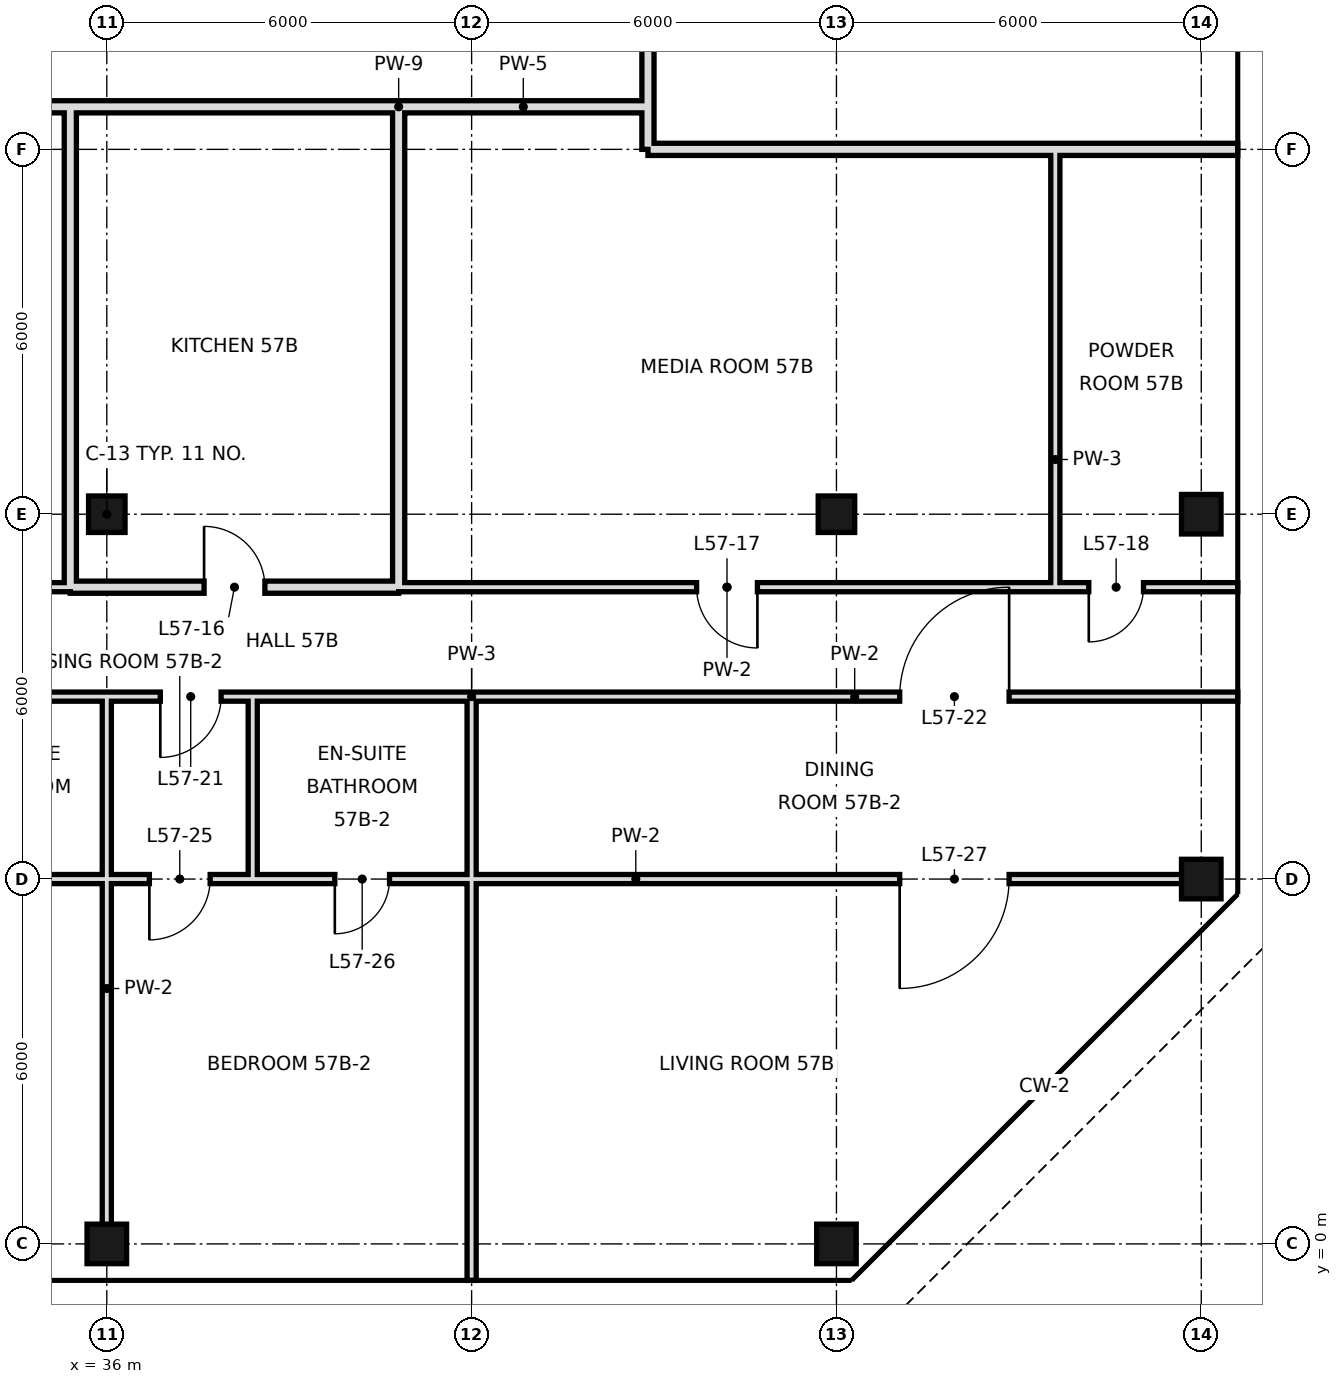
"""IFC4 building model, lengths in metres.
Left out: names, types, materials, properties, quantities, classifications, styles, units other than length and angle.
Written with IfcOpenShell. Run it as: python <this file> out.ifc"""

import sys

from ifc_helpers import new_model, si_unit, direction, frame, frame_2d, origin, origin_2d, place, context, subcontext, project, spatial, rectangle, hollow_rectangle, extrude, element, fill, save


model = new_model("IFC4")
c1 = context("Model", 3, precision=1e-05, world=origin(), true_north=direction((0.0, 1.0)))
c2 = subcontext(c1, "Body", "Model", "MODEL_VIEW")
j1 = project(units=[si_unit("LENGTHUNIT", "METRE"), si_unit("PLANEANGLEUNIT", "RADIAN")], contexts=[c1])
p1 = place(None, origin())
s1 = spatial("IfcSite", under=j1, at=p1, CompositionType="ELEMENT")
p2 = place(p1, origin())
s2 = spatial("IfcBuilding", under=s1, at=p2, CompositionType="ELEMENT")
p3 = place(p2, frame((0.0, 0.0, 243.2)))
s3 = spatial("IfcBuildingStorey", under=s2, at=p3, CompositionType="ELEMENT", Elevation=243.2)
p4 = place(p3, frame((36.0, 0.0, 0.0), z_axis=(0.0, 0.0, 1.0), x_axis=(1.0, 0.0, 0.0)))
e1 = element("IfcColumn", 1, at=p4, inside=s3, PredefinedType="COLUMN", context=c2, shape_type="SweptSolid", body=[
    extrude(hollow_rectangle(XDim=0.65, YDim=0.65, WallThickness=0.032, at=origin_2d()), origin(), (0.0, 0.0, 1.0), 3.6),
])
p5 = place(p3, frame((36.0, 12.0, 0.0), z_axis=(0.0, 0.0, 1.0), x_axis=(1.0, 0.0, 0.0)))
e2 = element("IfcColumn", 2, at=p5, inside=s3, PredefinedType="COLUMN", context=c2, shape_type="SweptSolid", body=[
    extrude(hollow_rectangle(XDim=0.6, YDim=0.6, WallThickness=0.028, at=origin_2d()), origin(), (0.0, 0.0, 1.0), 3.6),
])
p6 = place(p3, frame((48.0, 0.0, 0.0), z_axis=(0.0, 0.0, 1.0), x_axis=(1.0, 0.0, 0.0)))
e3 = element("IfcColumn", 3, at=p6, inside=s3, PredefinedType="COLUMN", context=c2, shape_type="SweptSolid", body=[
    extrude(hollow_rectangle(XDim=0.65, YDim=0.65, WallThickness=0.032, at=origin_2d()), origin(), (0.0, 0.0, 1.0), 3.6),
])
p7 = place(p3, frame((48.0, 12.0, 0.0), z_axis=(0.0, 0.0, 1.0), x_axis=(1.0, 0.0, 0.0)))
e4 = element("IfcColumn", 4, at=p7, inside=s3, PredefinedType="COLUMN", context=c2, shape_type="SweptSolid", body=[
    extrude(hollow_rectangle(XDim=0.6, YDim=0.6, WallThickness=0.028, at=origin_2d()), origin(), (0.0, 0.0, 1.0), 3.6),
])
for number, where, z_axis, x_axis in (
    (5, (54.0, 6.0, 0.0), (0.0, 0.0, 1.0), (1.0, 0.0, 0.0)),
    (6, (54.0, 12.0, 0.0), (0.0, 0.0, 1.0), (1.0, 0.0, 0.0)),
):
    element("IfcColumn", number, at=place(p3, frame(where, z_axis=z_axis, x_axis=x_axis)), inside=s3, PredefinedType="COLUMN", context=c2, shape_type="SweptSolid", body=[
        extrude(hollow_rectangle(XDim=0.65, YDim=0.65, WallThickness=0.032, at=origin_2d()), origin(), (0.0, 0.0, 1.0), 3.6),
    ])
p8 = place(p3, frame((35.4, 10.8, 0.0), z_axis=(0.0, 0.0, 1.0), x_axis=(0.0, 1.0, 0.0)))
e7 = element("IfcWall", 7, at=p8, inside=s3, PredefinedType="SOLIDWALL", context=c2, shape_type="SweptSolid", body=[
    extrude(rectangle(XDim=7.9, YDim=0.2, at=frame_2d((3.95, 0.0))), origin(), (0.0, 0.0, 1.0), 2.72),
])
p9 = place(p3, frame((36.0, 0.0, 0.0), z_axis=(0.0, 0.0, 1.0), x_axis=(0.0, 1.0, 0.0)))
e8 = element("IfcWall", 8, at=p9, inside=s3, PredefinedType="PARTITIONING", context=c2, shape_type="SweptSolid", body=[
    extrude(rectangle(XDim=6.0, YDim=0.15, at=frame_2d((3.0, 0.0))), origin(), (0.0, 0.0, 1.0), 2.72),
])
p10 = place(p3, frame((36.0, 6.0, 0.0), z_axis=(0.0, 0.0, 1.0), x_axis=(0.0, 1.0, 0.0)))
e9 = element("IfcWall", 9, at=p10, inside=s3, PredefinedType="PARTITIONING", context=c2, shape_type="SweptSolid", body=[
    extrude(rectangle(XDim=3.0, YDim=0.15, at=frame_2d((1.5, 0.0))), origin(), (0.0, 0.0, 1.0), 2.72),
])
p11 = place(p3, frame((38.4, 6.0, 0.0), z_axis=(0.0, 0.0, 1.0), x_axis=(0.0, 1.0, 0.0)))
e10 = element("IfcWall", 10, at=p11, inside=s3, PredefinedType="PARTITIONING", context=c2, shape_type="SweptSolid", body=[
    extrude(rectangle(XDim=3.0, YDim=0.15, at=frame_2d((1.5, 0.0))), origin(), (0.0, 0.0, 1.0), 3.42),
])
p12 = place(p3, frame((40.8, 10.8, 0.0), z_axis=(0.0, 0.0, 1.0), x_axis=(0.0, 1.0, 0.0)))
e11 = element("IfcWall", 11, at=p12, inside=s3, PredefinedType="SOLIDWALL", context=c2, shape_type="SweptSolid", body=[
    extrude(rectangle(XDim=7.9, YDim=0.2, at=frame_2d((3.95, 0.0))), origin(), (0.0, 0.0, 1.0), 2.72),
])
p13 = place(p3, frame((42.0, -0.6, 0.0), z_axis=(0.0, 0.0, 1.0), x_axis=(0.0, 1.0, 0.0)))
e12 = element("IfcWall", 12, at=p13, inside=s3, PredefinedType="PARTITIONING", context=c2, shape_type="SweptSolid", body=[
    extrude(rectangle(XDim=6.6, YDim=0.15, at=frame_2d((3.3, 0.0))), origin(), (0.0, 0.0, 1.0), 2.72),
])
p14 = place(p3, frame((42.0, 6.0, 0.0), z_axis=(0.0, 0.0, 1.0), x_axis=(0.0, 1.0, 0.0)))
e13 = element("IfcWall", 13, at=p14, inside=s3, PredefinedType="PARTITIONING", context=c2, shape_type="SweptSolid", body=[
    extrude(rectangle(XDim=3.0, YDim=0.15, at=frame_2d((1.5, 0.0))), origin(), (0.0, 0.0, 1.0), 2.72),
])
p15 = place(p3, frame((44.9, 18.0, 0.0), z_axis=(0.0, 0.0, 1.0), x_axis=(0.0, 1.0, 0.0)))
e14 = element("IfcWall", 14, at=p15, inside=s3, PredefinedType="SOLIDWALL", context=c2, shape_type="SweptSolid", body=[
    extrude(rectangle(XDim=30.6, YDim=0.2, at=frame_2d((15.3, 0.0))), origin(), (0.0, 0.0, 1.0), 2.72),
])
p16 = place(p15, frame((20.27, 0.0, 0.0)))
e15 = element("IfcOpeningElement", 15, at=p16, cuts=e14, PredefinedType="OPENING", context=c2, shape_type="SweptSolid", body=[
    extrude(rectangle(XDim=1.2, YDim=2.4, at=frame_2d((0.6, 1.2))), frame((0.0, 0.11, 0.0), z_axis=(0.0, -1.0, 0.0), x_axis=(1.0, 0.0, 0.0)), (0.0, 0.0, 1.0), 0.22),
])
p17 = place(p3, frame((51.6, 10.8, 0.0), z_axis=(0.0, 0.0, 1.0), x_axis=(0.0, 1.0, 0.0)))
e16 = element("IfcWall", 16, at=p17, inside=s3, PredefinedType="PARTITIONING", context=c2, shape_type="SweptSolid", body=[
    extrude(rectangle(XDim=7.2, YDim=0.15, at=frame_2d((3.6, 0.0))), origin(), (0.0, 0.0, 1.0), 3.42),
])
p18 = place(p3, frame((35.4, 10.8, 0.0), z_axis=(0.0, 0.0, 1.0), x_axis=(1.0, 0.0, 0.0)))
e17 = element("IfcWall", 17, at=p18, inside=s3, PredefinedType="SOLIDWALL", context=c2, shape_type="SweptSolid", body=[
    extrude(rectangle(XDim=5.4, YDim=0.2, at=frame_2d((2.7, 0.0))), origin(), (0.0, 0.0, 1.0), 2.72),
])
p19 = place(p18, frame((2.2, 0.0, 0.0)))
e18 = element("IfcOpeningElement", 18, at=p19, cuts=e17, PredefinedType="OPENING", context=c2, shape_type="SweptSolid", body=[
    extrude(rectangle(XDim=1.0, YDim=2.4, at=frame_2d((0.5, 1.2))), frame((0.0, 0.11, 0.0), z_axis=(0.0, -1.0, 0.0), x_axis=(1.0, 0.0, 0.0)), (0.0, 0.0, 1.0), 0.22),
])
p20 = place(p3, frame((6.0, 10.8, 0.0), z_axis=(0.0, 0.0, 1.0), x_axis=(1.0, 0.0, 0.0)))
e19 = element("IfcWall", 19, at=p20, inside=s3, PredefinedType="PARTITIONING", context=c2, shape_type="SweptSolid", body=[
    extrude(rectangle(XDim=29.4, YDim=0.15, at=frame_2d((14.7, 0.0))), origin(), (0.0, 0.0, 1.0), 3.42),
])
p21 = place(p20, frame((3.4, 0.0, 0.0)))
e20 = element("IfcOpeningElement", 20, at=p21, cuts=e19, PredefinedType="OPENING", context=c2, shape_type="SweptSolid", body=[
    extrude(rectangle(XDim=1.0, YDim=2.4, at=frame_2d((0.5, 1.2))), frame((0.0, 0.085, 0.0), z_axis=(0.0, -1.0, 0.0), x_axis=(1.0, 0.0, 0.0)), (0.0, 0.0, 1.0), 0.17),
])
p22 = place(p20, frame((9.4, 0.0, 0.0)))
e21 = element("IfcOpeningElement", 21, at=p22, cuts=e19, PredefinedType="OPENING", context=c2, shape_type="SweptSolid", body=[
    extrude(rectangle(XDim=1.0, YDim=2.4, at=frame_2d((0.5, 1.2))), frame((0.0, 0.085, 0.0), z_axis=(0.0, -1.0, 0.0), x_axis=(1.0, 0.0, 0.0)), (0.0, 0.0, 1.0), 0.17),
])
p23 = place(p20, frame((19.3, 0.0, 0.0)))
e22 = element("IfcOpeningElement", 22, at=p23, cuts=e19, PredefinedType="OPENING", context=c2, shape_type="SweptSolid", body=[
    extrude(rectangle(XDim=1.0, YDim=2.4, at=frame_2d((0.5, 1.2))), frame((0.0, 0.085, 0.0), z_axis=(0.0, -1.0, 0.0), x_axis=(1.0, 0.0, 0.0)), (0.0, 0.0, 1.0), 0.17),
])
p24 = place(p20, frame((25.0, 0.0, 0.0)))
e23 = element("IfcOpeningElement", 23, at=p24, cuts=e19, PredefinedType="OPENING", context=c2, shape_type="SweptSolid", body=[
    extrude(rectangle(XDim=1.0, YDim=2.4, at=frame_2d((0.5, 1.2))), frame((0.0, 0.085, 0.0), z_axis=(0.0, -1.0, 0.0), x_axis=(1.0, 0.0, 0.0)), (0.0, 0.0, 1.0), 0.17),
])
p25 = place(p3, frame((40.8, 10.8, 0.0), z_axis=(0.0, 0.0, 1.0), x_axis=(1.0, 0.0, 0.0)))
e24 = element("IfcWall", 24, at=p25, inside=s3, PredefinedType="PARTITIONING", context=c2, shape_type="SweptSolid", body=[
    extrude(rectangle(XDim=10.8, YDim=0.15, at=frame_2d((5.4, 0.0))), origin(), (0.0, 0.0, 1.0), 3.42),
])
p26 = place(p25, frame((4.9, 0.0, 0.0)))
e25 = element("IfcOpeningElement", 25, at=p26, cuts=e24, PredefinedType="OPENING", context=c2, shape_type="SweptSolid", body=[
    extrude(rectangle(XDim=1.0, YDim=2.4, at=frame_2d((0.5, 1.2))), frame((0.0, 0.085, 0.0), z_axis=(0.0, -1.0, 0.0), x_axis=(1.0, 0.0, 0.0)), (0.0, 0.0, 1.0), 0.17),
])
p27 = place(p3, frame((51.6, 10.8, 0.0), z_axis=(0.0, 0.0, 1.0), x_axis=(1.0, 0.0, 0.0)))
e26 = element("IfcWall", 26, at=p27, inside=s3, PredefinedType="PARTITIONING", context=c2, shape_type="SweptSolid", body=[
    extrude(rectangle(XDim=3.0, YDim=0.15, at=frame_2d((1.5, 0.0))), origin(), (0.0, 0.0, 1.0), 3.42),
])
p28 = place(p27, frame((0.55, 0.0, 0.0)))
e27 = element("IfcOpeningElement", 27, at=p28, cuts=e26, PredefinedType="OPENING", context=c2, shape_type="SweptSolid", body=[
    extrude(rectangle(XDim=0.9, YDim=2.4, at=frame_2d((0.45, 1.2))), frame((0.0, 0.085, 0.0), z_axis=(0.0, -1.0, 0.0), x_axis=(1.0, 0.0, 0.0)), (0.0, 0.0, 1.0), 0.17),
])
p29 = place(p3, frame((44.9, 18.0, 0.0), z_axis=(0.0, 0.0, 1.0), x_axis=(1.0, 0.0, 0.0)))
e28 = element("IfcWall", 28, at=p29, inside=s3, PredefinedType="SOLIDWALL", context=c2, shape_type="SweptSolid", body=[
    extrude(rectangle(XDim=9.7, YDim=0.2, at=frame_2d((4.85, 0.0))), origin(), (0.0, 0.0, 1.0), 2.72),
])
p30 = place(p3, frame((6.0, 18.7, 0.0), z_axis=(0.0, 0.0, 1.0), x_axis=(1.0, 0.0, 0.0)))
e29 = element("IfcWall", 29, at=p30, inside=s3, PredefinedType="SOLIDWALL", context=c2, shape_type="SweptSolid", body=[
    extrude(rectangle(XDim=29.4, YDim=0.2, at=frame_2d((14.7, 0.0))), origin(), (0.0, 0.0, 1.0), 2.72),
])
p31 = place(p30, frame((1.54, 0.0, 0.0)))
e30 = element("IfcOpeningElement", 30, at=p31, cuts=e29, PredefinedType="OPENING", context=c2, shape_type="SweptSolid", body=[
    extrude(rectangle(XDim=1.2, YDim=2.4, at=frame_2d((0.6, 1.2))), frame((0.0, 0.11, 0.0), z_axis=(0.0, -1.0, 0.0), x_axis=(1.0, 0.0, 0.0)), (0.0, 0.0, 1.0), 0.22),
])
p32 = place(p30, frame((19.58, 0.0, 0.0)))
e31 = element("IfcOpeningElement", 31, at=p32, cuts=e29, PredefinedType="OPENING", context=c2, shape_type="SweptSolid", body=[
    extrude(rectangle(XDim=1.2, YDim=2.4, at=frame_2d((0.6, 1.2))), frame((0.0, 0.11, 0.0), z_axis=(0.0, -1.0, 0.0), x_axis=(1.0, 0.0, 0.0)), (0.0, 0.0, 1.0), 0.22),
])
p33 = place(p3, frame((40.8, 18.7, 0.0), z_axis=(0.0, 0.0, 1.0), x_axis=(1.0, 0.0, 0.0)))
e32 = element("IfcWall", 32, at=p33, inside=s3, PredefinedType="SOLIDWALL", context=c2, shape_type="SweptSolid", body=[
    extrude(rectangle(XDim=4.1, YDim=0.2, at=frame_2d((2.05, 0.0))), origin(), (0.0, 0.0, 1.0), 2.72),
])
p34 = place(p3, frame((35.4, 18.7, 0.0), z_axis=(0.0, 0.0, 1.0), x_axis=(1.0, 0.0, 0.0)))
e33 = element("IfcWall", 33, at=p34, inside=s3, PredefinedType="SOLIDWALL", context=c2, shape_type="SweptSolid", body=[
    extrude(rectangle(XDim=5.4, YDim=0.2, at=frame_2d((2.7, 0.0))), origin(), (0.0, 0.0, 1.0), 3.42),
])
p35 = place(p3, frame((36.0, 6.0, 0.0), z_axis=(0.0, 0.0, 1.0), x_axis=(1.0, 0.0, 0.0)))
e34 = element("IfcWall", 34, at=p35, inside=s3, PredefinedType="PARTITIONING", context=c2, shape_type="SweptSolid", body=[
    extrude(rectangle(XDim=2.4, YDim=0.15, at=frame_2d((1.2, 0.0))), origin(), (0.0, 0.0, 1.0), 2.97),
])
p36 = place(p35, frame((0.7, 0.0, 0.0)))
e35 = element("IfcOpeningElement", 35, at=p36, cuts=e34, PredefinedType="OPENING", context=c2, shape_type="SweptSolid", body=[
    extrude(rectangle(XDim=1.0, YDim=2.4, at=frame_2d((0.5, 1.2))), frame((0.0, 0.085, 0.0), z_axis=(0.0, -1.0, 0.0), x_axis=(1.0, 0.0, 0.0)), (0.0, 0.0, 1.0), 0.17),
])
p37 = place(p3, frame((42.0, 6.0, 0.0), z_axis=(0.0, 0.0, 1.0), x_axis=(1.0, 0.0, 0.0)))
e36 = element("IfcWall", 36, at=p37, inside=s3, PredefinedType="PARTITIONING", context=c2, shape_type="SweptSolid", body=[
    extrude(rectangle(XDim=12.0, YDim=0.15, at=frame_2d((6.0, 0.0))), origin(), (0.0, 0.0, 1.0), 2.97),
])
p38 = place(p37, frame((7.04, 0.0, 0.0)))
e37 = element("IfcOpeningElement", 37, at=p38, cuts=e36, PredefinedType="OPENING", context=c2, shape_type="SweptSolid", body=[
    extrude(rectangle(XDim=1.8, YDim=2.4, at=frame_2d((0.9, 1.2))), frame((0.0, 0.085, 0.0), z_axis=(0.0, -1.0, 0.0), x_axis=(1.0, 0.0, 0.0)), (0.0, 0.0, 1.0), 0.17),
])
p39 = place(p3, frame((33.0, 6.0, 0.0), z_axis=(0.0, 0.0, 1.0), x_axis=(1.0, 0.0, 0.0)))
e38 = element("IfcWall", 38, at=p39, inside=s3, PredefinedType="PARTITIONING", context=c2, shape_type="SweptSolid", body=[
    extrude(rectangle(XDim=3.0, YDim=0.15, at=frame_2d((1.5, 0.0))), origin(), (0.0, 0.0, 1.0), 2.97),
])
p40 = place(p39, frame((0.73, 0.0, 0.0)))
e39 = element("IfcOpeningElement", 39, at=p40, cuts=e38, PredefinedType="OPENING", context=c2, shape_type="SweptSolid", body=[
    extrude(rectangle(XDim=0.9, YDim=2.4, at=frame_2d((0.45, 1.2))), frame((0.0, 0.085, 0.0), z_axis=(0.0, -1.0, 0.0), x_axis=(1.0, 0.0, 0.0)), (0.0, 0.0, 1.0), 0.17),
])
p41 = place(p3, frame((38.4, 6.0, 0.0), z_axis=(0.0, 0.0, 1.0), x_axis=(1.0, 0.0, 0.0)))
e40 = element("IfcWall", 40, at=p41, inside=s3, PredefinedType="PARTITIONING", context=c2, shape_type="SweptSolid", body=[
    extrude(rectangle(XDim=3.6, YDim=0.15, at=frame_2d((1.8, 0.0))), origin(), (0.0, 0.0, 1.0), 2.97),
])
p42 = place(p41, frame((1.35, 0.0, 0.0)))
e41 = element("IfcOpeningElement", 41, at=p42, cuts=e40, PredefinedType="OPENING", context=c2, shape_type="SweptSolid", body=[
    extrude(rectangle(XDim=0.9, YDim=2.4, at=frame_2d((0.45, 1.2))), frame((0.0, 0.085, 0.0), z_axis=(0.0, -1.0, 0.0), x_axis=(1.0, 0.0, 0.0)), (0.0, 0.0, 1.0), 0.17),
])
p43 = place(p3, frame((36.0, 9.0, 0.0), z_axis=(0.0, 0.0, 1.0), x_axis=(1.0, 0.0, 0.0)))
e42 = element("IfcWall", 42, at=p43, inside=s3, PredefinedType="PARTITIONING", context=c2, shape_type="SweptSolid", body=[
    extrude(rectangle(XDim=2.4, YDim=0.15, at=frame_2d((1.2, 0.0))), origin(), (0.0, 0.0, 1.0), 3.42),
])
p44 = place(p43, frame((0.88, 0.0, 0.0)))
e43 = element("IfcOpeningElement", 43, at=p44, cuts=e42, PredefinedType="OPENING", context=c2, shape_type="SweptSolid", body=[
    extrude(rectangle(XDim=1.0, YDim=2.4, at=frame_2d((0.5, 1.2))), frame((0.0, 0.085, 0.0), z_axis=(0.0, -1.0, 0.0), x_axis=(1.0, 0.0, 0.0)), (0.0, 0.0, 1.0), 0.17),
])
p45 = place(p3, frame((42.0, 9.0, 0.0), z_axis=(0.0, 0.0, 1.0), x_axis=(1.0, 0.0, 0.0)))
e44 = element("IfcWall", 44, at=p45, inside=s3, PredefinedType="PARTITIONING", context=c2, shape_type="SweptSolid", body=[
    extrude(rectangle(XDim=12.6, YDim=0.15, at=frame_2d((6.3, 0.0))), origin(), (0.0, 0.0, 1.0), 3.42),
])
p46 = place(p45, frame((7.04, 0.0, 0.0)))
e45 = element("IfcOpeningElement", 45, at=p46, cuts=e44, PredefinedType="OPENING", context=c2, shape_type="SweptSolid", body=[
    extrude(rectangle(XDim=1.8, YDim=2.4, at=frame_2d((0.9, 1.2))), frame((0.0, 0.085, 0.0), z_axis=(0.0, -1.0, 0.0), x_axis=(1.0, 0.0, 0.0)), (0.0, 0.0, 1.0), 0.17),
])
p47 = place(p3, frame((33.0, 9.0, 0.0), z_axis=(0.0, 0.0, 1.0), x_axis=(1.0, 0.0, 0.0)))
e46 = element("IfcWall", 46, at=p47, inside=s3, PredefinedType="PARTITIONING", context=c2, shape_type="SweptSolid", body=[
    extrude(rectangle(XDim=3.0, YDim=0.15, at=frame_2d((1.5, 0.0))), origin(), (0.0, 0.0, 1.0), 3.42),
])
p48 = place(p3, frame((38.4, 9.0, 0.0), z_axis=(0.0, 0.0, 1.0), x_axis=(1.0, 0.0, 0.0)))
e47 = element("IfcWall", 47, at=p48, inside=s3, PredefinedType="PARTITIONING", context=c2, shape_type="SweptSolid", body=[
    extrude(rectangle(XDim=3.6, YDim=0.15, at=frame_2d((1.8, 0.0))), origin(), (0.0, 0.0, 1.0), 3.42),
])
p49 = place(p19, origin())
e48 = element("IfcDoor", 48, at=p49, inside=s3, OperationType="SINGLE_SWING_LEFT", PredefinedType="DOOR", context=c2, shape_type="SweptSolid", body=[
    extrude(rectangle(XDim=1.0, YDim=2.4, at=frame_2d((0.5, 1.2))), frame((0.0, 0.025, 0.0), z_axis=(0.0, -1.0, 0.0), x_axis=(1.0, 0.0, 0.0)), (0.0, 0.0, 1.0), 0.05),
])
fill(e18, e48)
p50 = place(p26, origin())
e49 = element("IfcDoor", 49, at=p50, inside=s3, OperationType="SINGLE_SWING_RIGHT", PredefinedType="DOOR", context=c2, shape_type="SweptSolid", body=[
    extrude(rectangle(XDim=1.0, YDim=2.4, at=frame_2d((0.5, 1.2))), frame((0.0, 0.025, 0.0), z_axis=(0.0, -1.0, 0.0), x_axis=(1.0, 0.0, 0.0)), (0.0, 0.0, 1.0), 0.05),
])
fill(e25, e49)
p51 = place(p28, frame((0.9, 0.0, 0.0), z_axis=(0.0, 0.0, 1.0), x_axis=(-1.0, 0.0, 0.0)))
e50 = element("IfcDoor", 50, at=p51, inside=s3, OperationType="SINGLE_SWING_RIGHT", PredefinedType="DOOR", context=c2, shape_type="SweptSolid", body=[
    extrude(rectangle(XDim=0.9, YDim=2.4, at=frame_2d((0.45, 1.2))), frame((0.0, 0.025, 0.0), z_axis=(0.0, -1.0, 0.0), x_axis=(1.0, 0.0, 0.0)), (0.0, 0.0, 1.0), 0.05),
])
fill(e27, e50)
p52 = place(p44, frame((1.0, 0.0, 0.0), z_axis=(0.0, 0.0, 1.0), x_axis=(-1.0, 0.0, 0.0)))
e51 = element("IfcDoor", 51, at=p52, inside=s3, OperationType="SINGLE_SWING_RIGHT", PredefinedType="DOOR", context=c2, shape_type="SweptSolid", body=[
    extrude(rectangle(XDim=1.0, YDim=2.4, at=frame_2d((0.5, 1.2))), frame((0.0, 0.025, 0.0), z_axis=(0.0, -1.0, 0.0), x_axis=(1.0, 0.0, 0.0)), (0.0, 0.0, 1.0), 0.05),
])
fill(e43, e51)
p53 = place(p46, frame((1.8, 0.0, 0.0), z_axis=(0.0, 0.0, 1.0), x_axis=(-1.0, 0.0, 0.0)))
e52 = element("IfcDoor", 52, at=p53, inside=s3, OperationType="SINGLE_SWING_LEFT", PredefinedType="DOOR", context=c2, shape_type="SweptSolid", body=[
    extrude(rectangle(XDim=1.8, YDim=2.4, at=frame_2d((0.9, 1.2))), frame((0.0, 0.025, 0.0), z_axis=(0.0, -1.0, 0.0), x_axis=(1.0, 0.0, 0.0)), (0.0, 0.0, 1.0), 0.05),
])
fill(e45, e52)
p54 = place(p36, frame((1.0, 0.0, 0.0), z_axis=(0.0, 0.0, 1.0), x_axis=(-1.0, 0.0, 0.0)))
e53 = element("IfcDoor", 53, at=p54, inside=s3, OperationType="SINGLE_SWING_RIGHT", PredefinedType="DOOR", context=c2, shape_type="SweptSolid", body=[
    extrude(rectangle(XDim=1.0, YDim=2.4, at=frame_2d((0.5, 1.2))), frame((0.0, 0.025, 0.0), z_axis=(0.0, -1.0, 0.0), x_axis=(1.0, 0.0, 0.0)), (0.0, 0.0, 1.0), 0.05),
])
fill(e35, e53)
p55 = place(p42, frame((0.9, 0.0, 0.0), z_axis=(0.0, 0.0, 1.0), x_axis=(-1.0, 0.0, 0.0)))
e54 = element("IfcDoor", 54, at=p55, inside=s3, OperationType="SINGLE_SWING_RIGHT", PredefinedType="DOOR", context=c2, shape_type="SweptSolid", body=[
    extrude(rectangle(XDim=0.9, YDim=2.4, at=frame_2d((0.45, 1.2))), frame((0.0, 0.025, 0.0), z_axis=(0.0, -1.0, 0.0), x_axis=(1.0, 0.0, 0.0)), (0.0, 0.0, 1.0), 0.05),
])
fill(e41, e54)
p56 = place(p38, frame((1.8, 0.0, 0.0), z_axis=(0.0, 0.0, 1.0), x_axis=(-1.0, 0.0, 0.0)))
e55 = element("IfcDoor", 55, at=p56, inside=s3, OperationType="SINGLE_SWING_RIGHT", PredefinedType="DOOR", context=c2, shape_type="SweptSolid", body=[
    extrude(rectangle(XDim=1.8, YDim=2.4, at=frame_2d((0.9, 1.2))), frame((0.0, 0.025, 0.0), z_axis=(0.0, -1.0, 0.0), x_axis=(1.0, 0.0, 0.0)), (0.0, 0.0, 1.0), 0.05),
])
fill(e37, e55)
save(model, sys.argv[1])
